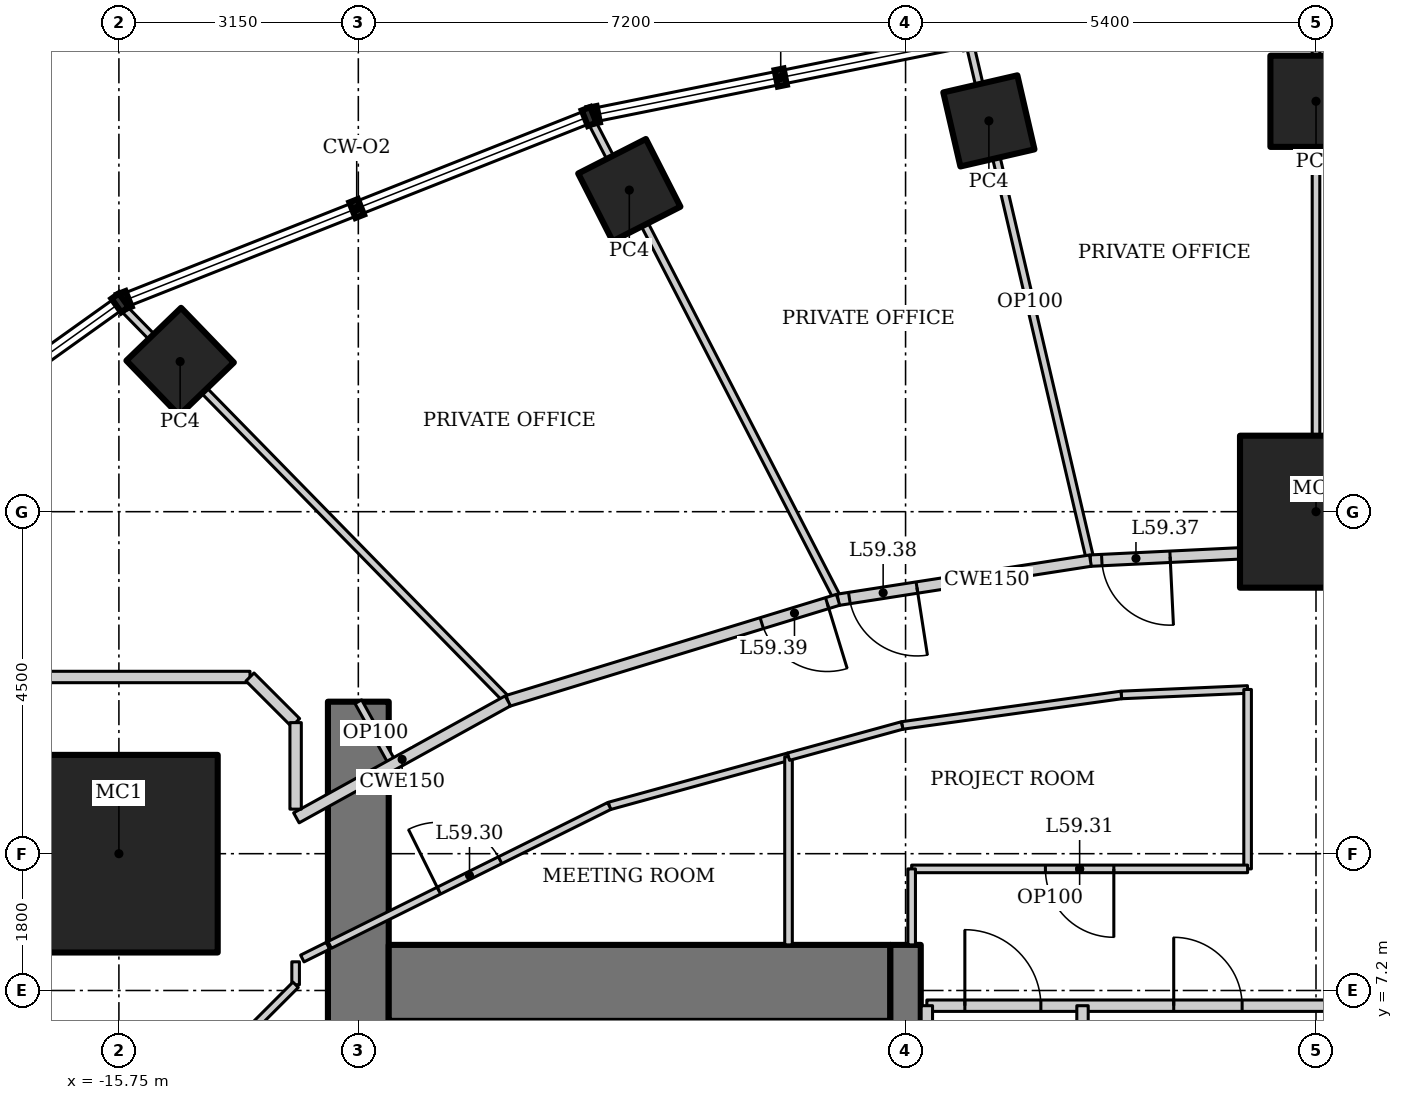
"""IFC4 building model, lengths in metres.
Left out: names, types, materials, properties, quantities, classifications, styles, units other than length and angle.
Written with IfcOpenShell. Run it as: python <this file> out.ifc"""

import sys

from ifc_helpers import new_model, si_unit, direction, frame, frame_2d, origin, origin_2d, place, context, subcontext, project, spatial, rectangle, hollow_rectangle, extrude, element, fill, save


model = new_model("IFC4")
c1 = context("Model", 3, precision=1e-05, world=origin(), true_north=direction((0.0, 1.0)))
c2 = subcontext(c1, "Body", "Model", "MODEL_VIEW")
j1 = project(units=[si_unit("LENGTHUNIT", "METRE"), si_unit("PLANEANGLEUNIT", "RADIAN")], contexts=[c1])
p1 = place(None, origin())
s1 = spatial("IfcSite", under=j1, at=p1, CompositionType="ELEMENT")
p2 = place(p1, origin())
s2 = spatial("IfcBuilding", under=s1, at=p2, CompositionType="ELEMENT")
p3 = place(p2, frame((0.0, 0.0, 253.6)))
s3 = spatial("IfcBuildingStorey", under=s2, at=p3, CompositionType="ELEMENT", Elevation=253.6)
p4 = place(p3, frame((0.0, 13.5, 0.0), z_axis=(0.0, 0.0, 1.0), x_axis=(1.0, 0.0, 0.0)))
e1 = element("IfcColumn", 1, at=p4, inside=s3, PredefinedType="COLUMN", context=c2, shape_type="SweptSolid", body=[
    extrude(hollow_rectangle(XDim=2.0, YDim=2.0, WallThickness=0.17, at=origin_2d()), origin(), (0.0, 0.0, 1.0), 4.2),
])
p5 = place(p3, frame((-15.75, 9.0, 0.0), z_axis=(0.0, 0.0, 1.0), x_axis=(1.0, 0.0, 0.0)))
e2 = element("IfcColumn", 2, at=p5, inside=s3, PredefinedType="COLUMN", context=c2, shape_type="SweptSolid", body=[
    extrude(hollow_rectangle(XDim=2.6, YDim=2.6, WallThickness=0.13, at=origin_2d()), origin(), (0.0, 0.0, 1.0), 4.2),
])
p6 = place(p3, frame((0.0, 18.9, 0.0), z_axis=(0.0, 0.0, 1.0), x_axis=(1.0, 0.0, 0.0)))
e3 = element("IfcColumn", 3, at=p6, inside=s3, PredefinedType="COLUMN", context=c2, shape_type="SweptSolid", body=[
    extrude(hollow_rectangle(XDim=1.2, YDim=1.2, WallThickness=0.1, at=origin_2d()), origin(), (0.0, 0.0, 1.0), 4.2),
])
for number, where, z_axis, x_axis in (
    (4, (-4.304, 18.642, 0.0), (0.0, 0.0, 1.0), (0.974, 0.225, 0.0)),
    (5, (-9.035, 17.731, 0.0), (0.0, 0.0, 1.0), (0.891, 0.454, 0.0)),
    (6, (-14.944, 15.475, 0.0), (0.0, 0.0, 1.0), (0.719, 0.695, 0.0)),
):
    element("IfcColumn", number, at=place(p3, frame(where, z_axis=z_axis, x_axis=x_axis)), inside=s3, PredefinedType="COLUMN", context=c2, shape_type="SweptSolid", body=[
        extrude(hollow_rectangle(XDim=1.0, YDim=1.0, WallThickness=0.08, at=origin_2d()), origin(), (0.0, 0.0, 1.0), 4.2),
    ])
p7 = place(p3, frame((-12.6, 11.0, 0.0), z_axis=(0.0, 0.0, 1.0), x_axis=(0.0, -1.0, 0.0)))
e7 = element("IfcWall", 7, at=p7, inside=s3, PredefinedType="SHEAR", context=c2, shape_type="SweptSolid", body=[
    extrude(rectangle(XDim=22.0, YDim=0.8, at=frame_2d((11.0, 0.0))), origin(), (0.0, 0.0, 1.0), 4.2),
])
p8 = place(p7, frame((10.1, 0.0, 0.0)))
e8 = element("IfcOpeningElement", 8, at=p8, cuts=e7, PredefinedType="OPENING", context=c2, shape_type="SweptSolid", body=[
    extrude(rectangle(XDim=1.8, YDim=2.1, at=frame_2d((0.9, 1.05))), frame((0.0, 0.41, 0.0), z_axis=(0.0, -1.0, 0.0), x_axis=(1.0, 0.0, 0.0)), (0.0, 0.0, 1.0), 0.82),
])
p9 = place(p3, frame((-5.6, 7.3, 0.0), z_axis=(0.0, 0.0, 1.0), x_axis=(-1.0, 0.0, 0.0)))
e9 = element("IfcWall", 9, at=p9, inside=s3, PredefinedType="SHEAR", context=c2, shape_type="SweptSolid", body=[
    extrude(rectangle(XDim=6.6, YDim=1.0, at=frame_2d((3.3, 0.0))), origin(), (0.0, 0.0, 1.0), 4.2),
])
p10 = place(p3, frame((-5.4, 7.8, 0.0), z_axis=(0.0, 0.0, 1.0), x_axis=(0.0, -1.0, 0.0)))
e10 = element("IfcWall", 10, at=p10, inside=s3, PredefinedType="SHEAR", context=c2, shape_type="SweptSolid", body=[
    extrude(rectangle(XDim=14.6, YDim=0.4, at=frame_2d((7.3, 0.0))), origin(), (0.0, 0.0, 1.0), 4.2),
])
p11 = place(p10, frame((6.4, 0.0, 0.0)))
e11 = element("IfcOpeningElement", 11, at=p11, cuts=e10, PredefinedType="OPENING", context=c2, shape_type="SweptSolid", body=[
    extrude(rectangle(XDim=1.8, YDim=2.1, at=frame_2d((0.9, 1.05))), frame((0.0, 0.21, 0.0), z_axis=(0.0, -1.0, 0.0), x_axis=(1.0, 0.0, 0.0)), (0.0, 0.0, 1.0), 0.42),
])
p12 = place(p3, frame((0.0, 19.945, 0.0), z_axis=(0.0, 0.0, 1.0), x_axis=(0.0, -1.0, 0.0)))
e12 = element("IfcWall", 12, at=p12, inside=s3, PredefinedType="PARTITIONING", context=c2, shape_type="SweptSolid", body=[
    extrude(rectangle(XDim=6.945, YDim=0.1, at=frame_2d((3.472, 0.0))), origin(), (0.0, 0.0, 1.0), 3.644),
])
p13 = place(p3, frame((-4.556, 19.657, 0.0), z_axis=(0.0, 0.0, 1.0), x_axis=(0.22733791689, -0.973815933092, 0.0)))
e13 = element("IfcWall", 13, at=p13, inside=s3, PredefinedType="PARTITIONING", context=c2, shape_type="SweptSolid", body=[
    extrude(rectangle(XDim=6.984, YDim=0.1, at=frame_2d((3.492, 0.0))), origin(), (0.0, 0.0, 1.0), 3.108),
])
p14 = place(p3, frame((-9.54, 18.65, 0.0), z_axis=(0.0, 0.0, 1.0), x_axis=(0.45810402165, -0.88889859115, 0.0)))
e14 = element("IfcWall", 14, at=p14, inside=s3, PredefinedType="PARTITIONING", context=c2, shape_type="SweptSolid", body=[
    extrude(rectangle(XDim=7.098, YDim=0.1, at=frame_2d((3.549, 0.0))), origin(), (0.0, 0.0, 1.0), 3.108),
])
p15 = place(p3, frame((-15.709, 16.199, 0.0), z_axis=(0.0, 0.0, 1.0), x_axis=(0.699362525935, -0.714767135029, 0.0)))
e15 = element("IfcWall", 15, at=p15, inside=s3, PredefinedType="PARTITIONING", context=c2, shape_type="SweptSolid", body=[
    extrude(rectangle(XDim=7.259, YDim=0.1, at=frame_2d((3.629, 0.0))), origin(), (0.0, 0.0, 1.0), 3.41),
])
p16 = place(p3, frame((2.968, 12.856, 0.0), z_axis=(0.0, 0.0, 1.0), x_axis=(-0.998824412818, 0.04847465687, 0.0)))
e16 = element("IfcWall", 16, at=p16, inside=s3, PredefinedType="PARTITIONING", context=c2, shape_type="SweptSolid", body=[
    extrude(rectangle(XDim=2.971, YDim=0.15, at=frame_2d((1.486, 0.0))), origin(), (0.0, 0.0, 1.0), 4.05),
])
p17 = place(p16, frame((0.15, 0.0, 0.0)))
e17 = element("IfcOpeningElement", 17, at=p17, cuts=e16, PredefinedType="OPENING", context=c2, shape_type="SweptSolid", body=[
    extrude(rectangle(XDim=0.9, YDim=2.1, at=frame_2d((0.45, 1.05))), frame((0.0, 0.085, 0.0), z_axis=(0.0, -1.0, 0.0), x_axis=(1.0, 0.0, 0.0)), (0.0, 0.0, 1.0), 0.17),
])
p18 = place(p3, frame((0.0, 13.0, 0.0), z_axis=(0.0, 0.0, 1.0), x_axis=(-0.998824412818, -0.04847465687, 0.0)))
e18 = element("IfcWall", 18, at=p18, inside=s3, PredefinedType="PARTITIONING", context=c2, shape_type="SweptSolid", body=[
    extrude(rectangle(XDim=2.971, YDim=0.15, at=frame_2d((1.486, 0.0))), origin(), (0.0, 0.0, 1.0), 4.05),
])
p19 = place(p18, frame((1.921, 0.0, 0.0)))
e19 = element("IfcOpeningElement", 19, at=p19, cuts=e18, PredefinedType="OPENING", context=c2, shape_type="SweptSolid", body=[
    extrude(rectangle(XDim=0.9, YDim=2.1, at=frame_2d((0.45, 1.05))), frame((0.0, 0.085, 0.0), z_axis=(0.0, -1.0, 0.0), x_axis=(1.0, 0.0, 0.0)), (0.0, 0.0, 1.0), 0.17),
])
p20 = place(p3, frame((-2.968, 12.856, 0.0), z_axis=(0.0, 0.0, 1.0), x_axis=(-0.988174283057, -0.153334882869, 0.0)))
e20 = element("IfcWall", 20, at=p20, inside=s3, PredefinedType="PARTITIONING", context=c2, shape_type="SweptSolid", body=[
    extrude(rectangle(XDim=3.36, YDim=0.15, at=frame_2d((1.68, 0.0))), origin(), (0.0, 0.0, 1.0), 4.05),
])
p21 = place(p20, frame((2.31, 0.0, 0.0)))
e21 = element("IfcOpeningElement", 21, at=p21, cuts=e20, PredefinedType="OPENING", context=c2, shape_type="SweptSolid", body=[
    extrude(rectangle(XDim=0.9, YDim=2.1, at=frame_2d((0.45, 1.05))), frame((0.0, 0.085, 0.0), z_axis=(0.0, -1.0, 0.0), x_axis=(1.0, 0.0, 0.0)), (0.0, 0.0, 1.0), 0.17),
])
p22 = place(p3, frame((-6.288, 12.341, 0.0), z_axis=(0.0, 0.0, 1.0), x_axis=(-0.956185837153, -0.292760388079, 0.0)))
e22 = element("IfcWall", 22, at=p22, inside=s3, PredefinedType="PARTITIONING", context=c2, shape_type="SweptSolid", body=[
    extrude(rectangle(XDim=4.544, YDim=0.15, at=frame_2d((2.272, 0.0))), origin(), (0.0, 0.0, 1.0), 4.05),
])
p23 = place(p22, frame((0.15, 0.0, 0.0)))
e23 = element("IfcOpeningElement", 23, at=p23, cuts=e22, PredefinedType="OPENING", context=c2, shape_type="SweptSolid", body=[
    extrude(rectangle(XDim=0.9, YDim=2.1, at=frame_2d((0.45, 1.05))), frame((0.0, 0.085, 0.0), z_axis=(0.0, -1.0, 0.0), x_axis=(1.0, 0.0, 0.0)), (0.0, 0.0, 1.0), 0.17),
])
p24 = place(p3, frame((-5.12, 7.0, 0.0), z_axis=(0.0, 0.0, 1.0), x_axis=(1.0, 0.0, 0.0)))
e24 = element("IfcWall", 24, at=p24, inside=s3, PredefinedType="SOLIDWALL", context=c2, shape_type="SweptSolid", body=[
    extrude(rectangle(XDim=10.24, YDim=0.15, at=frame_2d((5.12, 0.0))), origin(), (0.0, 0.0, 1.0), 4.05),
])
p25 = place(p24, frame((0.5, 0.0, 0.0)))
e25 = element("IfcOpeningElement", 25, at=p25, cuts=e24, PredefinedType="OPENING", context=c2, shape_type="SweptSolid", body=[
    extrude(rectangle(XDim=1.0, YDim=2.1, at=frame_2d((0.5, 1.05))), frame((0.0, 0.085, 0.0), z_axis=(0.0, -1.0, 0.0), x_axis=(1.0, 0.0, 0.0)), (0.0, 0.0, 1.0), 0.17),
])
p26 = place(p24, frame((3.248, 0.0, 0.0)))
e26 = element("IfcOpeningElement", 26, at=p26, cuts=e24, PredefinedType="OPENING", context=c2, shape_type="SweptSolid", body=[
    extrude(rectangle(XDim=0.9, YDim=2.1, at=frame_2d((0.45, 1.05))), frame((0.0, 0.085, 0.0), z_axis=(0.0, -1.0, 0.0), x_axis=(1.0, 0.0, 0.0)), (0.0, 0.0, 1.0), 0.17),
])
p27 = place(p24, frame((6.525, 0.0, 0.0)))
e27 = element("IfcOpeningElement", 27, at=p27, cuts=e24, PredefinedType="OPENING", context=c2, shape_type="SweptSolid", body=[
    extrude(rectangle(XDim=0.9, YDim=2.1, at=frame_2d((0.45, 1.05))), frame((0.0, 0.085, 0.0), z_axis=(0.0, -1.0, 0.0), x_axis=(1.0, 0.0, 0.0)), (0.0, 0.0, 1.0), 0.17),
])
p28 = place(p24, frame((8.952, 0.0, 0.0)))
e28 = element("IfcOpeningElement", 28, at=p28, cuts=e24, PredefinedType="OPENING", context=c2, shape_type="SweptSolid", body=[
    extrude(rectangle(XDim=0.9, YDim=2.1, at=frame_2d((0.45, 1.05))), frame((0.0, 0.085, 0.0), z_axis=(0.0, -1.0, 0.0), x_axis=(1.0, 0.0, 0.0)), (0.0, 0.0, 1.0), 0.17),
])
for number, where, z_axis, x_axis in (
    (29, (-5.12, 2.6, 0.0), (0.0, 0.0, 1.0), (0.0, 1.0, 0.0)),
    (30, (-3.072, 2.6, 0.0), (0.0, 0.0, 1.0), (0.0, 1.0, 0.0)),
):
    element("IfcWall", number, at=place(p3, frame(where, z_axis=z_axis, x_axis=x_axis)), inside=s3, PredefinedType="SOLIDWALL", context=c2, shape_type="SweptSolid", body=[
        extrude(rectangle(XDim=4.4, YDim=0.15, at=frame_2d((2.2, 0.0))), origin(), (0.0, 0.0, 1.0), 4.05),
    ])
p29 = place(p3, frame((-9.298, 9.628, 0.0), z_axis=(0.0, 0.0, 1.0), x_axis=(0.964255150805, 0.264975478385, 0.0)))
e31 = element("IfcWall", 31, at=p29, inside=s3, PredefinedType="PARTITIONING", context=c2, shape_type="SweptSolid", body=[
    extrude(rectangle(XDim=2.445, YDim=0.1, at=frame_2d((1.223, 0.0))), origin(), (0.0, 0.0, 1.0), 4.05),
])
p30 = place(p3, frame((-6.94, 10.276, 0.0), z_axis=(0.0, 0.0, 1.0), x_axis=(0.0, -1.0, 0.0)))
e32 = element("IfcWall", 32, at=p30, inside=s3, PredefinedType="PARTITIONING", context=c2, shape_type="SweptSolid", body=[
    extrude(rectangle(XDim=2.476, YDim=0.1, at=frame_2d((1.238, 0.0))), origin(), (0.0, 0.0, 1.0), 4.05),
])
p31 = place(p3, frame((-12.977, 7.8, 0.0), z_axis=(0.0, 0.0, 1.0), x_axis=(0.895529831139, 0.445001484874, 0.0)))
e33 = element("IfcWall", 33, at=p31, inside=s3, PredefinedType="PARTITIONING", context=c2, shape_type="SweptSolid", body=[
    extrude(rectangle(XDim=4.108, YDim=0.1, at=frame_2d((2.054, 0.0))), origin(), (0.0, 0.0, 1.0), 4.05),
])
p32 = place(p31, frame((1.604, 0.0, 0.0)))
e34 = element("IfcOpeningElement", 34, at=p32, cuts=e33, PredefinedType="OPENING", context=c2, shape_type="SweptSolid", body=[
    extrude(rectangle(XDim=0.9, YDim=2.1, at=frame_2d((0.45, 1.05))), frame((0.0, 0.06, 0.0), z_axis=(0.0, -1.0, 0.0), x_axis=(1.0, 0.0, 0.0)), (0.0, 0.0, 1.0), 0.12),
])
p33 = place(p3, frame((-5.445, 10.687, 0.0), z_axis=(0.0, 0.0, 1.0), x_axis=(0.99045099049, 0.137865280027, 0.0)))
e35 = element("IfcWall", 35, at=p33, inside=s3, PredefinedType="PARTITIONING", context=c2, shape_type="SweptSolid", body=[
    extrude(rectangle(XDim=2.913, YDim=0.1, at=frame_2d((1.457, 0.0))), origin(), (0.0, 0.0, 1.0), 4.05),
])
p34 = place(p3, frame((-2.56, 11.089, 0.0), z_axis=(0.0, 0.0, 1.0), x_axis=(0.999053939397, 0.043488230303, 0.0)))
e36 = element("IfcWall", 36, at=p34, inside=s3, PredefinedType="PARTITIONING", context=c2, shape_type="SweptSolid", body=[
    extrude(rectangle(XDim=1.662, YDim=0.1, at=frame_2d((0.831, 0.0))), origin(), (0.0, 0.0, 1.0), 4.05),
])
p35 = place(p3, frame((-0.9, 11.161, 0.0), z_axis=(0.0, 0.0, 1.0), x_axis=(0.0, -1.0, 0.0)))
e37 = element("IfcWall", 37, at=p35, inside=s3, PredefinedType="PARTITIONING", context=c2, shape_type="SweptSolid", body=[
    extrude(rectangle(XDim=2.361, YDim=0.1, at=frame_2d((1.18, 0.0))), origin(), (0.0, 0.0, 1.0), 4.05),
])
p36 = place(p3, frame((-0.9, 8.8, 0.0), z_axis=(0.0, 0.0, 1.0), x_axis=(-1.0, 0.0, 0.0)))
e38 = element("IfcWall", 38, at=p36, inside=s3, PredefinedType="PARTITIONING", context=c2, shape_type="SweptSolid", body=[
    extrude(rectangle(XDim=4.42, YDim=0.1, at=frame_2d((2.21, 0.0))), origin(), (0.0, 0.0, 1.0), 4.05),
])
p37 = place(p36, frame((1.76, 0.0, 0.0)))
e39 = element("IfcOpeningElement", 39, at=p37, cuts=e38, PredefinedType="OPENING", context=c2, shape_type="SweptSolid", body=[
    extrude(rectangle(XDim=0.9, YDim=2.1, at=frame_2d((0.45, 1.05))), frame((0.0, 0.06, 0.0), z_axis=(0.0, -1.0, 0.0), x_axis=(1.0, 0.0, 0.0)), (0.0, 0.0, 1.0), 0.12),
])
p38 = place(p3, frame((-5.32, 8.8, 0.0), z_axis=(0.0, 0.0, 1.0), x_axis=(0.0, -1.0, 0.0)))
e40 = element("IfcWall", 40, at=p38, inside=s3, PredefinedType="PARTITIONING", context=c2, shape_type="SweptSolid", body=[
    extrude(rectangle(XDim=1.0, YDim=0.1, at=frame_2d((0.5, 0.0))), origin(), (0.0, 0.0, 1.0), 4.05),
])
p39 = place(p3, frame((-6.94, 10.276, 0.0), z_axis=(0.0, 0.0, 1.0), x_axis=(0.964227536736, 0.265075946476, 0.0)))
e41 = element("IfcWall", 41, at=p39, inside=s3, PredefinedType="PARTITIONING", context=c2, shape_type="SweptSolid", body=[
    extrude(rectangle(XDim=1.55, YDim=0.1, at=frame_2d((0.775, 0.0))), origin(), (0.0, 0.0, 1.0), 4.05),
])
p40 = place(p3, frame((-13.337, 7.621, 0.0), z_axis=(0.0, 0.0, 1.0), x_axis=(0.895721570004, 0.444615416995, 0.0)))
e42 = element("IfcWall", 42, at=p40, inside=s3, PredefinedType="PARTITIONING", context=c2, shape_type="SweptSolid", body=[
    extrude(rectangle(XDim=0.376, YDim=0.1, at=frame_2d((0.188, 0.0))), origin(), (0.0, 0.0, 1.0), 4.05),
])
p41 = place(p3, frame((-12.6, 11.0, 0.0), z_axis=(0.0, 0.0, 1.0), x_axis=(0.484103558985, -0.875010710893, 0.0)))
e43 = element("IfcWall", 43, at=p41, inside=s3, PredefinedType="PARTITIONING", context=c2, shape_type="SweptSolid", body=[
    extrude(rectangle(XDim=0.943, YDim=0.1, at=frame_2d((0.472, 0.0))), origin(), (0.0, 0.0, 1.0), 4.05),
])
p42 = place(p3, frame((-10.633, 11.01, 0.0), z_axis=(0.0, 0.0, 1.0), x_axis=(-0.875072100837, -0.483992580869, 0.0)))
e44 = element("IfcWall", 44, at=p42, inside=s3, PredefinedType="PARTITIONING", context=c2, shape_type="SweptSolid", body=[
    extrude(rectangle(XDim=3.179, YDim=0.15, at=frame_2d((1.59, 0.0))), origin(), (0.0, 0.0, 1.0), 4.05),
])
p43 = place(p3, frame((-13.425, 7.578, 0.0), z_axis=(0.0, 0.0, 1.0), x_axis=(0.0, -1.0, 0.0)))
e45 = element("IfcWall", 45, at=p43, inside=s3, PredefinedType="PARTITIONING", context=c2, shape_type="SweptSolid", body=[
    extrude(rectangle(XDim=0.302, YDim=0.1, at=frame_2d((0.151, 0.0))), origin(), (0.0, 0.0, 1.0), 4.05),
])
p44 = place(p3, frame((-13.425, 7.275, 0.0), z_axis=(0.0, 0.0, 1.0), x_axis=(-0.707106781187, -0.707106781187, 0.0)))
e46 = element("IfcWall", 46, at=p44, inside=s3, PredefinedType="PARTITIONING", context=c2, shape_type="SweptSolid", body=[
    extrude(rectangle(XDim=0.849, YDim=0.1, at=frame_2d((0.425, 0.0))), origin(), (0.0, 0.0, 1.0), 4.05),
])
p45 = place(p3, frame((-17.475, 11.325, 0.0), z_axis=(0.0, 0.0, 1.0), x_axis=(1.0, 0.0, 0.0)))
e47 = element("IfcWall", 47, at=p45, inside=s3, PredefinedType="PARTITIONING", context=c2, shape_type="SweptSolid", body=[
    extrude(rectangle(XDim=3.449, YDim=0.15, at=frame_2d((1.725, 0.0))), origin(), (0.0, 0.0, 1.0), 4.05),
])
p46 = place(p3, frame((-14.025, 11.325, 0.0), z_axis=(0.0, 0.0, 1.0), x_axis=(0.707106781187, -0.707106781187, 0.0)))
e48 = element("IfcWall", 48, at=p46, inside=s3, PredefinedType="PARTITIONING", context=c2, shape_type="SweptSolid", body=[
    extrude(rectangle(XDim=0.849, YDim=0.15, at=frame_2d((0.425, 0.0))), origin(), (0.0, 0.0, 1.0), 4.05),
])
p47 = place(p3, frame((-13.425, 10.725, 0.0), z_axis=(0.0, 0.0, 1.0), x_axis=(0.0, -1.0, 0.0)))
e49 = element("IfcWall", 49, at=p47, inside=s3, PredefinedType="PARTITIONING", context=c2, shape_type="SweptSolid", body=[
    extrude(rectangle(XDim=1.138, YDim=0.15, at=frame_2d((0.569, 0.0))), origin(), (0.0, 0.0, 1.0), 4.05),
])
p48 = place(p25, origin())
e50 = element("IfcDoor", 50, at=p48, inside=s3, OperationType="SINGLE_SWING_LEFT", PredefinedType="DOOR", context=c2, shape_type="SweptSolid", body=[
    extrude(rectangle(XDim=1.0, YDim=2.1, at=frame_2d((0.5, 1.05))), frame((0.0, 0.025, 0.0), z_axis=(0.0, -1.0, 0.0), x_axis=(1.0, 0.0, 0.0)), (0.0, 0.0, 1.0), 0.05),
])
fill(e25, e50)
p49 = place(p26, origin())
e51 = element("IfcDoor", 51, at=p49, inside=s3, OperationType="SINGLE_SWING_LEFT", PredefinedType="DOOR", context=c2, shape_type="SweptSolid", body=[
    extrude(rectangle(XDim=0.9, YDim=2.1, at=frame_2d((0.45, 1.05))), frame((0.0, 0.025, 0.0), z_axis=(0.0, -1.0, 0.0), x_axis=(1.0, 0.0, 0.0)), (0.0, 0.0, 1.0), 0.05),
])
fill(e26, e51)
p50 = place(p32, origin())
e52 = element("IfcDoor", 52, at=p50, inside=s3, OperationType="SINGLE_SWING_LEFT", PredefinedType="DOOR", context=c2, shape_type="SweptSolid", body=[
    extrude(rectangle(XDim=0.9, YDim=2.1, at=frame_2d((0.45, 1.05))), frame((0.0, 0.025, 0.0), z_axis=(0.0, -1.0, 0.0), x_axis=(1.0, 0.0, 0.0)), (0.0, 0.0, 1.0), 0.05),
])
fill(e34, e52)
p51 = place(p37, origin())
e53 = element("IfcDoor", 53, at=p51, inside=s3, OperationType="SINGLE_SWING_LEFT", PredefinedType="DOOR", context=c2, shape_type="SweptSolid", body=[
    extrude(rectangle(XDim=0.9, YDim=2.1, at=frame_2d((0.45, 1.05))), frame((0.0, 0.025, 0.0), z_axis=(0.0, -1.0, 0.0), x_axis=(1.0, 0.0, 0.0)), (0.0, 0.0, 1.0), 0.05),
])
fill(e39, e53)
p52 = place(p19, origin())
e54 = element("IfcDoor", 54, at=p52, inside=s3, OperationType="SINGLE_SWING_LEFT", PredefinedType="DOOR", context=c2, shape_type="SweptSolid", body=[
    extrude(rectangle(XDim=0.9, YDim=2.1, at=frame_2d((0.45, 1.05))), frame((0.0, 0.025, 0.0), z_axis=(0.0, -1.0, 0.0), x_axis=(1.0, 0.0, 0.0)), (0.0, 0.0, 1.0), 0.05),
])
fill(e19, e54)
p53 = place(p21, origin())
e55 = element("IfcDoor", 55, at=p53, inside=s3, OperationType="SINGLE_SWING_LEFT", PredefinedType="DOOR", context=c2, shape_type="SweptSolid", body=[
    extrude(rectangle(XDim=0.9, YDim=2.1, at=frame_2d((0.45, 1.05))), frame((0.0, 0.025, 0.0), z_axis=(0.0, -1.0, 0.0), x_axis=(1.0, 0.0, 0.0)), (0.0, 0.0, 1.0), 0.05),
])
fill(e21, e55)
p54 = place(p23, origin())
e56 = element("IfcDoor", 56, at=p54, inside=s3, OperationType="SINGLE_SWING_LEFT", PredefinedType="DOOR", context=c2, shape_type="SweptSolid", body=[
    extrude(rectangle(XDim=0.9, YDim=2.1, at=frame_2d((0.45, 1.05))), frame((0.0, 0.025, 0.0), z_axis=(0.0, -1.0, 0.0), x_axis=(1.0, 0.0, 0.0)), (0.0, 0.0, 1.0), 0.05),
])
fill(e23, e56)
save(model, sys.argv[1])
